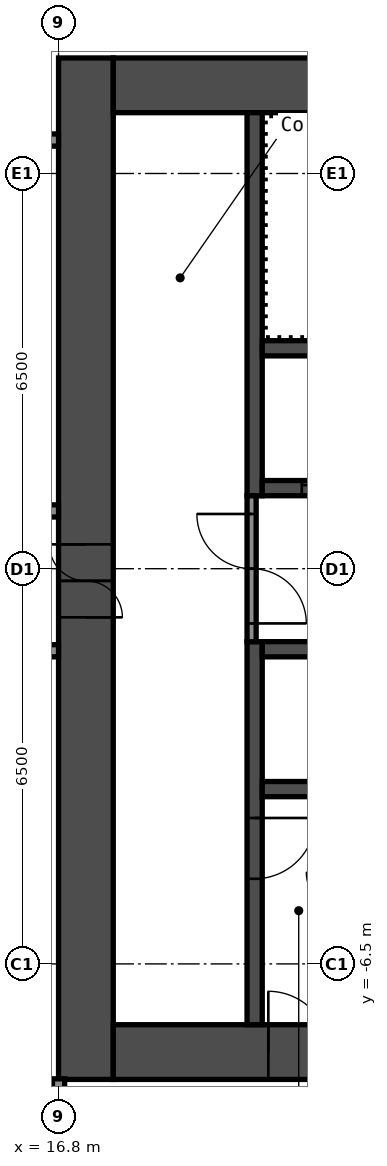
"""IFC4 building model, lengths in metres.
Left out: names, types, materials, properties, quantities, classifications, styles, units other than length and angle.
Written with IfcOpenShell. Run it as: python <this file> out.ifc"""

import sys

from ifc_helpers import new_model, si_unit, direction, frame, frame_2d, origin, place, context, subcontext, project, spatial, rectangle, extrude, element, fill, save


model = new_model("IFC4")
c1 = context("Model", 3, precision=1e-05, world=origin(), true_north=direction((0.0, 1.0)))
c2 = subcontext(c1, "Body", "Model", "MODEL_VIEW")
j1 = project(units=[si_unit("LENGTHUNIT", "METRE"), si_unit("PLANEANGLEUNIT", "RADIAN")], contexts=[c1])
p1 = place(None, origin())
s1 = spatial("IfcSite", under=j1, at=p1, CompositionType="ELEMENT")
p2 = place(p1, origin())
s2 = spatial("IfcBuilding", under=s1, at=p2, CompositionType="ELEMENT")
p3 = place(p2, frame((0.0, 0.0, 91.4)))
s3 = spatial("IfcBuildingStorey", under=s2, at=p3, CompositionType="ELEMENT", Elevation=91.4)
p4 = place(p3, frame((17.25, -8.4, 0.0), z_axis=(0.0, 0.0, 1.0), x_axis=(0.0, 1.0, 0.0)))
e1 = element("IfcWall", 1, at=p4, inside=s3, PredefinedType="SHEAR", context=c2, shape_type="SweptSolid", body=[
    extrude(rectangle(XDim=16.8, YDim=0.9, at=frame_2d((8.4, 0.0))), origin(), (0.0, 0.0, 1.0), 2.8),
])
p5 = place(p4, frame((7.6, 0.0, 0.0)))
e2 = element("IfcOpeningElement", 2, at=p5, cuts=e1, PredefinedType="OPENING", context=c2, shape_type="SweptSolid", body=[
    extrude(rectangle(XDim=1.2, YDim=2.1, at=frame_2d((0.6, 1.05))), frame((0.0, 0.46, 0.0), z_axis=(0.0, -1.0, 0.0), x_axis=(1.0, 0.0, 0.0)), (0.0, 0.0, 1.0), 0.92),
])
p6 = place(p3, frame((17.7, 7.95, 0.0), z_axis=(0.0, 0.0, 1.0), x_axis=(1.0, 0.0, 0.0)))
e3 = element("IfcWall", 3, at=p6, inside=s3, PredefinedType="SHEAR", context=c2, shape_type="SweptSolid", body=[
    extrude(rectangle(XDim=15.0, YDim=0.9, at=frame_2d((7.5, 0.0))), origin(), (0.0, 0.0, 1.0), 2.8),
])
p7 = place(p6, frame((10.4, 0.0, 0.0)))
e4 = element("IfcOpeningElement", 4, at=p7, cuts=e3, PredefinedType="OPENING", context=c2, shape_type="SweptSolid", body=[
    extrude(rectangle(XDim=1.2, YDim=2.1, at=frame_2d((0.6, 1.05))), frame((0.0, 0.46, 0.0), z_axis=(0.0, -1.0, 0.0), x_axis=(1.0, 0.0, 0.0)), (0.0, 0.0, 1.0), 0.92),
])
p8 = place(p6, frame((13.35, 0.0, 0.0)))
e5 = element("IfcOpeningElement", 5, at=p8, cuts=e3, PredefinedType="OPENING", context=c2, shape_type="SweptSolid", body=[
    extrude(rectangle(XDim=0.9, YDim=2.1, at=frame_2d((0.45, 1.05))), frame((0.0, 0.46, 0.0), z_axis=(0.0, -1.0, 0.0), x_axis=(1.0, 0.0, 0.0)), (0.0, 0.0, 1.0), 0.92),
])
p9 = place(p3, frame((17.7, -7.95, 0.0), z_axis=(0.0, 0.0, 1.0), x_axis=(1.0, 0.0, 0.0)))
e6 = element("IfcWall", 6, at=p9, inside=s3, PredefinedType="SHEAR", context=c2, shape_type="SweptSolid", body=[
    extrude(rectangle(XDim=15.0, YDim=0.9, at=frame_2d((7.5, 0.0))), origin(), (0.0, 0.0, 1.0), 2.8),
])
p10 = place(p9, frame((2.55, 0.0, 0.0)))
e7 = element("IfcOpeningElement", 7, at=p10, cuts=e6, PredefinedType="OPENING", context=c2, shape_type="SweptSolid", body=[
    extrude(rectangle(XDim=1.0, YDim=2.1, at=frame_2d((0.5, 1.05))), frame((0.0, 0.46, 0.0), z_axis=(0.0, -1.0, 0.0), x_axis=(1.0, 0.0, 0.0)), (0.0, 0.0, 1.0), 0.92),
])
p11 = place(p3, frame((20.025, 1.2, 0.0), z_axis=(0.0, 0.0, 1.0), x_axis=(0.0, 1.0, 0.0)))
e8 = element("IfcWall", 8, at=p11, inside=s3, PredefinedType="SHEAR", context=c2, shape_type="SweptSolid", body=[
    extrude(rectangle(XDim=6.3, YDim=0.25, at=frame_2d((3.15, 0.0))), origin(), (0.0, 0.0, 1.0), 2.8),
])
p12 = place(p3, frame((20.025, -7.5, 0.0), z_axis=(0.0, 0.0, 1.0), x_axis=(0.0, 1.0, 0.0)))
e9 = element("IfcWall", 9, at=p12, inside=s3, PredefinedType="SHEAR", context=c2, shape_type="SweptSolid", body=[
    extrude(rectangle(XDim=6.3, YDim=0.25, at=frame_2d((3.15, 0.0))), origin(), (0.0, 0.0, 1.0), 2.8),
])
p13 = place(p12, frame((2.4, 0.0, 0.0)))
e10 = element("IfcOpeningElement", 10, at=p13, cuts=e9, PredefinedType="OPENING", context=c2, shape_type="SweptSolid", body=[
    extrude(rectangle(XDim=1.0, YDim=2.1, at=frame_2d((0.5, 1.05))), frame((0.0, 0.135, 0.0), z_axis=(0.0, -1.0, 0.0), x_axis=(1.0, 0.0, 0.0)), (0.0, 0.0, 1.0), 0.27),
])
p14 = place(p3, frame((20.15, 1.325, 0.0), z_axis=(0.0, 0.0, 1.0), x_axis=(1.0, 0.0, 0.0)))
e11 = element("IfcWall", 11, at=p14, inside=s3, PredefinedType="SHEAR", context=c2, shape_type="SweptSolid", body=[
    extrude(rectangle(XDim=7.5, YDim=0.25, at=frame_2d((3.75, 0.0))), origin(), (0.0, 0.0, 1.0), 2.8),
])
p15 = place(p14, frame((0.65, 0.0, 0.0)))
e12 = element("IfcOpeningElement", 12, at=p15, cuts=e11, PredefinedType="OPENING", context=c2, shape_type="SweptSolid", body=[
    extrude(rectangle(XDim=1.1, YDim=2.1, at=frame_2d((0.55, 1.05))), frame((0.0, 0.135, 0.0), z_axis=(0.0, -1.0, 0.0), x_axis=(1.0, 0.0, 0.0)), (0.0, 0.0, 1.0), 0.27),
])
p16 = place(p14, frame((3.05, 0.0, 0.0)))
e13 = element("IfcOpeningElement", 13, at=p16, cuts=e11, PredefinedType="OPENING", context=c2, shape_type="SweptSolid", body=[
    extrude(rectangle(XDim=1.1, YDim=2.1, at=frame_2d((0.55, 1.05))), frame((0.0, 0.135, 0.0), z_axis=(0.0, -1.0, 0.0), x_axis=(1.0, 0.0, 0.0)), (0.0, 0.0, 1.0), 0.27),
])
p17 = place(p14, frame((5.45, 0.0, 0.0)))
e14 = element("IfcOpeningElement", 14, at=p17, cuts=e11, PredefinedType="OPENING", context=c2, shape_type="SweptSolid", body=[
    extrude(rectangle(XDim=1.1, YDim=2.1, at=frame_2d((0.55, 1.05))), frame((0.0, 0.135, 0.0), z_axis=(0.0, -1.0, 0.0), x_axis=(1.0, 0.0, 0.0)), (0.0, 0.0, 1.0), 0.27),
])
for number, where, z_axis, x_axis in (
    (15, (20.15, 3.625, 0.0), (0.0, 0.0, 1.0), (1.0, 0.0, 0.0)),
    (16, (20.15, -1.325, 0.0), (0.0, 0.0, 1.0), (1.0, 0.0, 0.0)),
    (17, (20.15, -3.625, 0.0), (0.0, 0.0, 1.0), (1.0, 0.0, 0.0)),
):
    element("IfcWall", number, at=place(p3, frame(where, z_axis=z_axis, x_axis=x_axis)), inside=s3, PredefinedType="SHEAR", context=c2, shape_type="SweptSolid", body=[
        extrude(rectangle(XDim=7.5, YDim=0.25, at=frame_2d((3.75, 0.0))), origin(), (0.0, 0.0, 1.0), 2.8),
    ])
p18 = place(p3, frame((19.975, -1.2, 0.0), z_axis=(0.0, 0.0, 1.0), x_axis=(0.0, 1.0, 0.0)))
e18 = element("IfcWall", 18, at=p18, inside=s3, PredefinedType="PARTITIONING", context=c2, shape_type="SweptSolid", body=[
    extrude(rectangle(XDim=2.4, YDim=0.15, at=frame_2d((1.2, 0.0))), origin(), (0.0, 0.0, 1.0), 2.8),
])
p19 = place(p18, frame((0.3, 0.0, 0.0)))
e19 = element("IfcOpeningElement", 19, at=p19, cuts=e18, PredefinedType="OPENING", context=c2, shape_type="SweptSolid", body=[
    extrude(rectangle(XDim=1.8, YDim=2.1, at=frame_2d((0.9, 1.05))), frame((0.0, 0.085, 0.0), z_axis=(0.0, -1.0, 0.0), x_axis=(1.0, 0.0, 0.0)), (0.0, 0.0, 1.0), 0.17),
])
p20 = place(p3, frame((-16.8, -1.35, 0.0), z_axis=(0.0, 0.0, 1.0), x_axis=(1.0, 0.0, 0.0)))
e20 = element("IfcWall", 20, at=p20, inside=s3, PredefinedType="PARTITIONING", context=c2, shape_type="SweptSolid", body=[
    extrude(rectangle(XDim=33.6, YDim=0.2, at=frame_2d((16.8, 0.0))), origin(), (0.0, 0.0, 1.0), 2.8),
])
p21 = place(p20, frame((2.0, 0.0, 0.0)))
e21 = element("IfcOpeningElement", 21, at=p21, cuts=e20, PredefinedType="OPENING", context=c2, shape_type="SweptSolid", body=[
    extrude(rectangle(XDim=1.0, YDim=2.1, at=frame_2d((0.5, 1.05))), frame((0.0, 0.11, 0.0), z_axis=(0.0, -1.0, 0.0), x_axis=(1.0, 0.0, 0.0)), (0.0, 0.0, 1.0), 0.22),
])
p22 = place(p20, frame((9.545, 0.0, 0.0)))
e22 = element("IfcOpeningElement", 22, at=p22, cuts=e20, PredefinedType="OPENING", context=c2, shape_type="SweptSolid", body=[
    extrude(rectangle(XDim=0.9, YDim=2.1, at=frame_2d((0.45, 1.05))), frame((0.0, 0.11, 0.0), z_axis=(0.0, -1.0, 0.0), x_axis=(1.0, 0.0, 0.0)), (0.0, 0.0, 1.0), 0.22),
])
p23 = place(p20, frame((13.745, 0.0, 0.0)))
e23 = element("IfcOpeningElement", 23, at=p23, cuts=e20, PredefinedType="OPENING", context=c2, shape_type="SweptSolid", body=[
    extrude(rectangle(XDim=0.9, YDim=2.1, at=frame_2d((0.45, 1.05))), frame((0.0, 0.11, 0.0), z_axis=(0.0, -1.0, 0.0), x_axis=(1.0, 0.0, 0.0)), (0.0, 0.0, 1.0), 0.22),
])
p24 = place(p20, frame((18.8, 0.0, 0.0)))
e24 = element("IfcOpeningElement", 24, at=p24, cuts=e20, PredefinedType="OPENING", context=c2, shape_type="SweptSolid", body=[
    extrude(rectangle(XDim=1.0, YDim=2.1, at=frame_2d((0.5, 1.05))), frame((0.0, 0.11, 0.0), z_axis=(0.0, -1.0, 0.0), x_axis=(1.0, 0.0, 0.0)), (0.0, 0.0, 1.0), 0.22),
])
p25 = place(p20, frame((30.6, 0.0, 0.0)))
e25 = element("IfcOpeningElement", 25, at=p25, cuts=e20, PredefinedType="OPENING", context=c2, shape_type="SweptSolid", body=[
    extrude(rectangle(XDim=1.0, YDim=2.1, at=frame_2d((0.5, 1.05))), frame((0.0, 0.11, 0.0), z_axis=(0.0, -1.0, 0.0), x_axis=(1.0, 0.0, 0.0)), (0.0, 0.0, 1.0), 0.22),
])
p26 = place(p3, frame((-16.8, 0.95, 0.0), z_axis=(0.0, 0.0, 1.0), x_axis=(1.0, 0.0, 0.0)))
e26 = element("IfcWall", 26, at=p26, inside=s3, PredefinedType="PARTITIONING", context=c2, shape_type="SweptSolid", body=[
    extrude(rectangle(XDim=33.6, YDim=0.2, at=frame_2d((16.8, 0.0))), origin(), (0.0, 0.0, 1.0), 2.8),
])
p27 = place(p26, frame((10.47, 0.0, 0.0)))
e27 = element("IfcOpeningElement", 27, at=p27, cuts=e26, PredefinedType="OPENING", context=c2, shape_type="SweptSolid", body=[
    extrude(rectangle(XDim=0.9, YDim=2.1, at=frame_2d((0.45, 1.05))), frame((0.0, 0.11, 0.0), z_axis=(0.0, -1.0, 0.0), x_axis=(1.0, 0.0, 0.0)), (0.0, 0.0, 1.0), 0.22),
])
p28 = place(p26, frame((14.67, 0.0, 0.0)))
e28 = element("IfcOpeningElement", 28, at=p28, cuts=e26, PredefinedType="OPENING", context=c2, shape_type="SweptSolid", body=[
    extrude(rectangle(XDim=0.9, YDim=2.1, at=frame_2d((0.45, 1.05))), frame((0.0, 0.11, 0.0), z_axis=(0.0, -1.0, 0.0), x_axis=(1.0, 0.0, 0.0)), (0.0, 0.0, 1.0), 0.22),
])
p29 = place(p26, frame((27.185, 0.0, 0.0)))
e29 = element("IfcOpeningElement", 29, at=p29, cuts=e26, PredefinedType="OPENING", context=c2, shape_type="SweptSolid", body=[
    extrude(rectangle(XDim=0.9, YDim=2.1, at=frame_2d((0.45, 1.05))), frame((0.0, 0.11, 0.0), z_axis=(0.0, -1.0, 0.0), x_axis=(1.0, 0.0, 0.0)), (0.0, 0.0, 1.0), 0.22),
])
p30 = place(p26, frame((31.385, 0.0, 0.0)))
e30 = element("IfcOpeningElement", 30, at=p30, cuts=e26, PredefinedType="OPENING", context=c2, shape_type="SweptSolid", body=[
    extrude(rectangle(XDim=0.9, YDim=2.1, at=frame_2d((0.45, 1.05))), frame((0.0, 0.11, 0.0), z_axis=(0.0, -1.0, 0.0), x_axis=(1.0, 0.0, 0.0)), (0.0, 0.0, 1.0), 0.22),
])
p31 = place(p3, frame((-16.8, 7.05, 0.0), z_axis=(0.0, 0.0, 1.0), x_axis=(1.0, 0.0, 0.0)))
e31 = element("IfcWall", 31, at=p31, inside=s3, PredefinedType="PARTITIONING", context=c2, shape_type="SweptSolid", body=[
    extrude(rectangle(XDim=33.6, YDim=0.2, at=frame_2d((16.8, 0.0))), origin(), (0.0, 0.0, 1.0), 2.8),
])
p32 = place(p31, frame((1.82, 0.0, 0.0)))
e32 = element("IfcOpeningElement", 32, at=p32, cuts=e31, PredefinedType="OPENING", context=c2, shape_type="SweptSolid", body=[
    extrude(rectangle(XDim=0.9, YDim=2.1, at=frame_2d((0.45, 1.05))), frame((0.0, 0.11, 0.0), z_axis=(0.0, -1.0, 0.0), x_axis=(1.0, 0.0, 0.0)), (0.0, 0.0, 1.0), 0.22),
])
p33 = place(p31, frame((6.02, 0.0, 0.0)))
e33 = element("IfcOpeningElement", 33, at=p33, cuts=e31, PredefinedType="OPENING", context=c2, shape_type="SweptSolid", body=[
    extrude(rectangle(XDim=0.9, YDim=2.1, at=frame_2d((0.45, 1.05))), frame((0.0, 0.11, 0.0), z_axis=(0.0, -1.0, 0.0), x_axis=(1.0, 0.0, 0.0)), (0.0, 0.0, 1.0), 0.22),
])
p34 = place(p31, frame((18.955, 0.0, 0.0)))
e34 = element("IfcOpeningElement", 34, at=p34, cuts=e31, PredefinedType="OPENING", context=c2, shape_type="SweptSolid", body=[
    extrude(rectangle(XDim=0.9, YDim=2.1, at=frame_2d((0.45, 1.05))), frame((0.0, 0.11, 0.0), z_axis=(0.0, -1.0, 0.0), x_axis=(1.0, 0.0, 0.0)), (0.0, 0.0, 1.0), 0.22),
])
p35 = place(p31, frame((23.155, 0.0, 0.0)))
e35 = element("IfcOpeningElement", 35, at=p35, cuts=e31, PredefinedType="OPENING", context=c2, shape_type="SweptSolid", body=[
    extrude(rectangle(XDim=0.9, YDim=2.1, at=frame_2d((0.45, 1.05))), frame((0.0, 0.11, 0.0), z_axis=(0.0, -1.0, 0.0), x_axis=(1.0, 0.0, 0.0)), (0.0, 0.0, 1.0), 0.22),
])
p36 = place(p3, frame((16.8, -15.55, 0.0), z_axis=(0.0, 0.0, 1.0), x_axis=(0.0, 1.0, 0.0)))
e36 = element("IfcWall", 36, at=p36, inside=s3, PredefinedType="PARTITIONING", context=c2, shape_type="SweptSolid", body=[
    extrude(rectangle(XDim=7.16, YDim=0.2, at=frame_2d((3.58, 0.0))), origin(), (0.0, 0.0, 1.0), 2.8),
])
p37 = place(p5, origin())
e37 = element("IfcDoor", 37, at=p37, inside=s3, OperationType="DOUBLE_DOOR_SINGLE_SWING", PredefinedType="DOOR", context=c2, shape_type="SweptSolid", body=[
    extrude(rectangle(XDim=1.2, YDim=2.1, at=frame_2d((0.6, 1.05))), frame((0.0, 0.025, 0.0), z_axis=(0.0, -1.0, 0.0), x_axis=(1.0, 0.0, 0.0)), (0.0, 0.0, 1.0), 0.05),
])
fill(e2, e37)
p38 = place(p10, origin())
e38 = element("IfcDoor", 38, at=p38, inside=s3, OperationType="SINGLE_SWING_RIGHT", PredefinedType="DOOR", context=c2, shape_type="SweptSolid", body=[
    extrude(rectangle(XDim=1.0, YDim=2.1, at=frame_2d((0.5, 1.05))), frame((0.0, 0.025, 0.0), z_axis=(0.0, -1.0, 0.0), x_axis=(1.0, 0.0, 0.0)), (0.0, 0.0, 1.0), 0.05),
])
fill(e7, e38)
p39 = place(p13, origin())
e39 = element("IfcDoor", 39, at=p39, inside=s3, OperationType="SINGLE_SWING_RIGHT", PredefinedType="DOOR", context=c2, shape_type="SweptSolid", body=[
    extrude(rectangle(XDim=1.0, YDim=2.1, at=frame_2d((0.5, 1.05))), frame((0.0, 0.025, 0.0), z_axis=(0.0, -1.0, 0.0), x_axis=(1.0, 0.0, 0.0)), (0.0, 0.0, 1.0), 0.05),
])
fill(e10, e39)
p40 = place(p19, origin())
e40 = element("IfcDoor", 40, at=p40, inside=s3, OperationType="DOUBLE_DOOR_SINGLE_SWING", PredefinedType="DOOR", context=c2, shape_type="SweptSolid", body=[
    extrude(rectangle(XDim=1.8, YDim=2.1, at=frame_2d((0.9, 1.05))), frame((0.0, 0.025, 0.0), z_axis=(0.0, -1.0, 0.0), x_axis=(1.0, 0.0, 0.0)), (0.0, 0.0, 1.0), 0.05),
])
fill(e19, e40)
p41 = place(p15, origin())
e41 = element("IfcDoor", 41, at=p41, inside=s3, OperationType="DOUBLE_DOOR_SLIDING", PredefinedType="DOOR", context=c2, shape_type="SweptSolid", body=[
    extrude(rectangle(XDim=1.1, YDim=2.1, at=frame_2d((0.55, 1.05))), frame((0.0, 0.025, 0.0), z_axis=(0.0, -1.0, 0.0), x_axis=(1.0, 0.0, 0.0)), (0.0, 0.0, 1.0), 0.05),
])
fill(e12, e41)
save(model, sys.argv[1])
